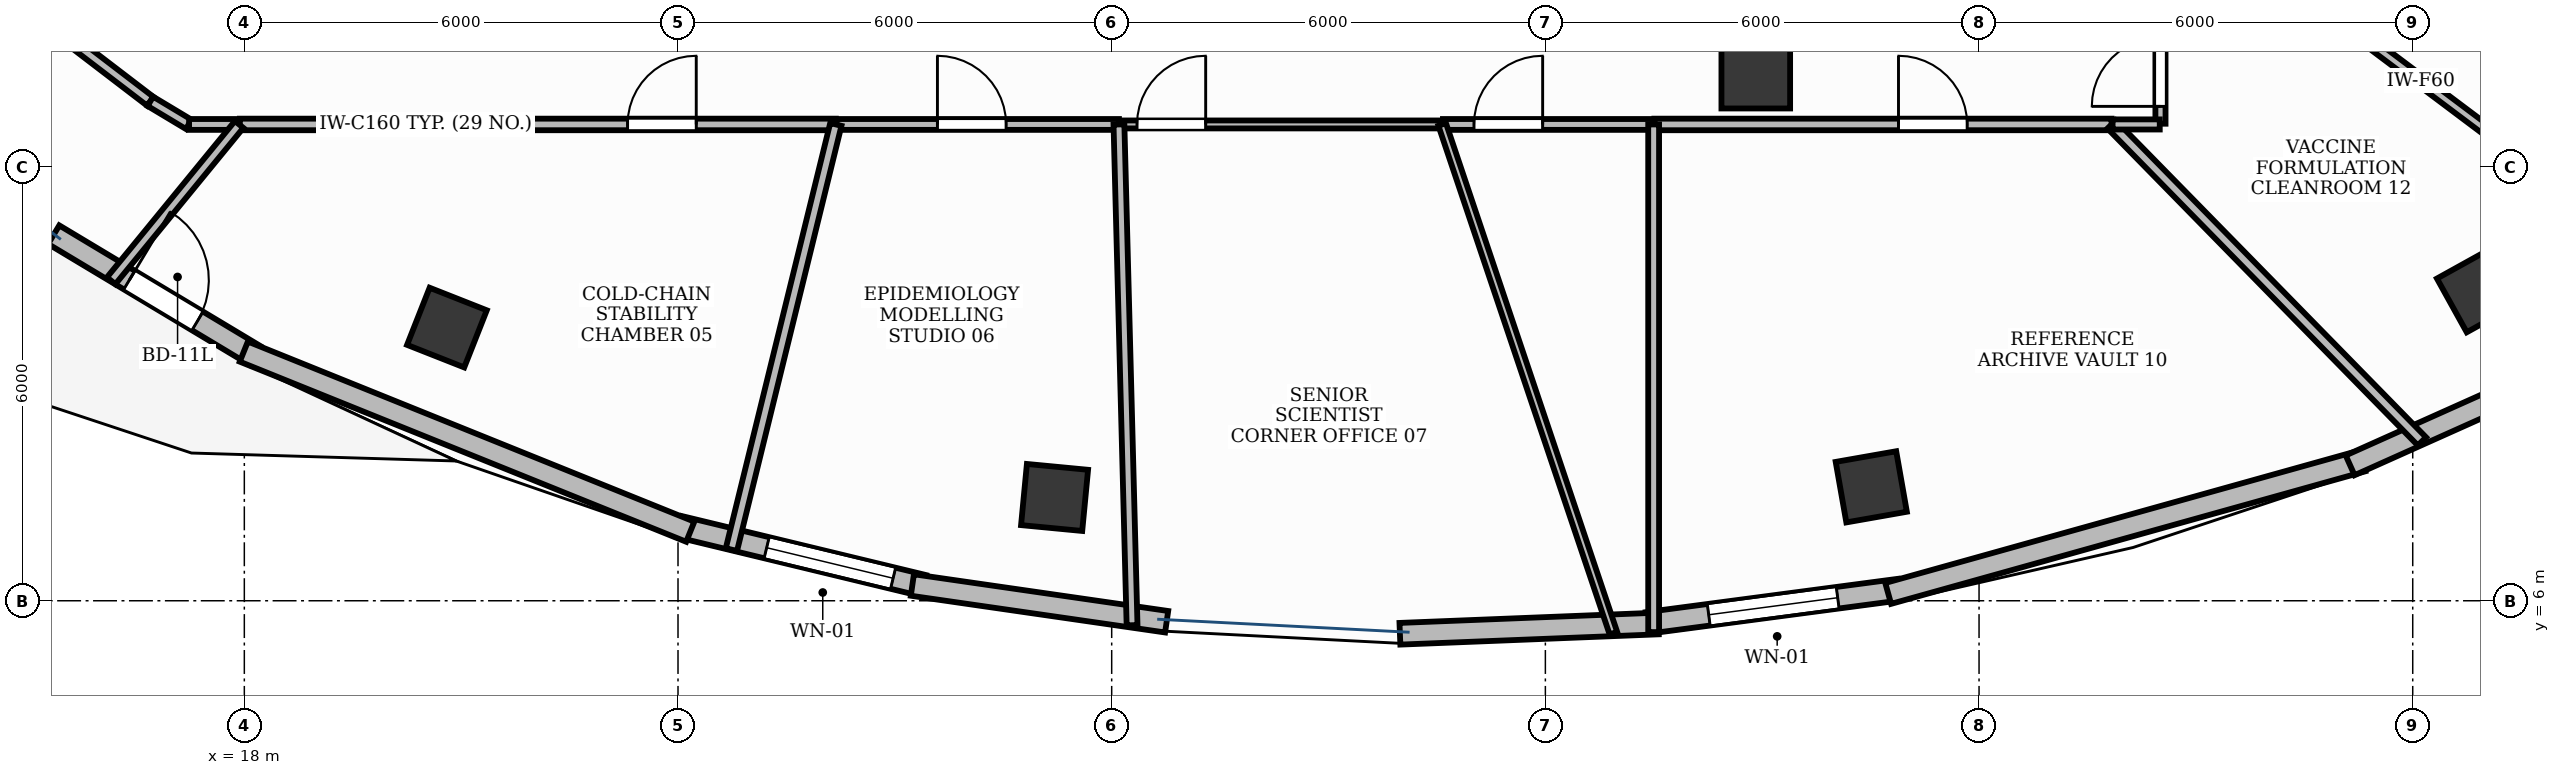
"""IFC4 building model, lengths in metres.
Left out: names, types, materials, properties, quantities, classifications, styles, units other than length and angle.
Written with IfcOpenShell. Run it as: python <this file> out.ifc"""

import sys

from ifc_helpers import new_model, si_unit, direction, frame, frame_2d, origin, origin_2d, place, context, subcontext, project, spatial, rectangle, extrude, element, fill, save


model = new_model("IFC4")
c1 = context("Model", 3, precision=1e-05, world=origin(), true_north=direction((0.0, 1.0)))
c2 = subcontext(c1, "Body", "Model", "MODEL_VIEW")
j1 = project(units=[si_unit("LENGTHUNIT", "METRE"), si_unit("PLANEANGLEUNIT", "RADIAN")], contexts=[c1])
p1 = place(None, origin())
s1 = spatial("IfcSite", under=j1, at=p1, CompositionType="ELEMENT")
p2 = place(p1, origin())
s2 = spatial("IfcBuilding", under=s1, at=p2, CompositionType="ELEMENT")
p3 = place(p2, frame((0.0, 0.0, 256.2)))
s3 = spatial("IfcBuildingStorey", under=s2, at=p3, CompositionType="ELEMENT", Elevation=256.2)
for number, where, z_axis, x_axis in (
    (1, (20.803, 9.78, -0.0), (0.0, 0.0, 1.0), (-0.93, 0.367, 0.0)),
    (2, (29.21, 7.429, -0.0), (0.0, 0.0, 1.0), (-0.995, 0.095, 0.0)),
    (3, (40.509, 7.576, -0.0), (0.0, 0.0, 1.0), (0.985, 0.173, 0.0)),
):
    element("IfcColumn", number, at=place(p3, frame(where, z_axis=z_axis, x_axis=x_axis)), inside=s3, PredefinedType="COLUMN", context=c2, shape_type="SweptSolid", body=[
        extrude(rectangle(XDim=0.85, YDim=0.85, at=origin_2d()), origin(), (0.0, 0.0, 1.0), 3.901),
    ])
p4 = place(p3, frame((38.911, 13.286, -0.0), z_axis=(0.0, 0.0, 1.0), x_axis=(1.0, 0.0, 0.0)))
e4 = element("IfcColumn", 4, at=p4, inside=s3, PredefinedType="COLUMN", context=c2, shape_type="SweptSolid", body=[
    extrude(rectangle(XDim=0.95, YDim=0.95, at=origin_2d()), origin(), (0.0, 0.0, 1.0), 3.901),
])
p5 = place(p3, frame((48.913, 10.292, -0.0), z_axis=(0.0, 0.0, 1.0), x_axis=(0.874535078577, 0.484962262797, 0.0)))
e5 = element("IfcColumn", 5, at=p5, inside=s3, PredefinedType="COLUMN", context=c2, shape_type="SweptSolid", body=[
    extrude(rectangle(XDim=0.85, YDim=0.85, at=origin_2d()), origin(), (0.0, 0.0, 1.0), 3.901),
])
p6 = place(p3, frame((15.363, 11.065, 0.0), z_axis=(0.0, 0.0, 1.0), x_axis=(0.857526080841, -0.514440492844, 0.0)))
e6 = element("IfcWall", 6, at=p6, inside=s3, PredefinedType="STANDARD", context=c2, shape_type="SweptSolid", body=[
    extrude(rectangle(XDim=3.249, YDim=0.3, at=frame_2d((1.624, 0.0))), origin(), (0.0, 0.0, 1.0), 3.9),
])
p7 = place(p6, frame((1.22, 0.0, 0.0)))
e7 = element("IfcOpeningElement", 7, at=p7, cuts=e6, PredefinedType="OPENING", context=c2, shape_type="SweptSolid", body=[
    extrude(rectangle(XDim=1.1, YDim=2.15, at=frame_2d((0.55, 1.075))), frame((0.0, 0.165, 0.0), z_axis=(0.0, -1.0, 0.0), x_axis=(1.0, 0.0, 0.0)), (0.0, 0.0, 1.0), 0.33),
])
p8 = place(p3, frame((24.022, 7.025, 0.0), z_axis=(0.0, 0.0, 1.0), x_axis=(0.972019132567, -0.23490169417, 0.0)))
e8 = element("IfcWall", 8, at=p8, inside=s3, PredefinedType="STANDARD", context=c2, shape_type="SweptSolid", body=[
    extrude(rectangle(XDim=3.472, YDim=0.3, at=frame_2d((1.736, 0.0))), origin(), (0.0, 0.0, 1.0), 3.9),
])
p9 = place(p8, frame((1.239, 0.0, 0.9)))
e9 = element("IfcOpeningElement", 9, at=p9, cuts=e8, PredefinedType="OPENING", context=c2, shape_type="SweptSolid", body=[
    extrude(rectangle(XDim=1.8, YDim=2.1, at=frame_2d((0.9, 1.05))), frame((0.0, 0.165, 0.0), z_axis=(0.0, -1.0, 0.0), x_axis=(1.0, 0.0, 0.0)), (0.0, 0.0, 1.0), 0.33),
])
p10 = place(p3, frame((37.408, 5.693, 0.0), z_axis=(0.0, 0.0, 1.0), x_axis=(0.991363126073, 0.131145538481, 0.0)))
e10 = element("IfcWall", 10, at=p10, inside=s3, PredefinedType="STANDARD", context=c2, shape_type="SweptSolid", body=[
    extrude(rectangle(XDim=3.518, YDim=0.3, at=frame_2d((1.759, 0.0))), origin(), (0.0, 0.0, 1.0), 3.9),
])
p11 = place(p10, frame((0.859, 0.0, 0.9)))
e11 = element("IfcOpeningElement", 11, at=p11, cuts=e10, PredefinedType="OPENING", context=c2, shape_type="SweptSolid", body=[
    extrude(rectangle(XDim=1.8, YDim=2.1, at=frame_2d((0.9, 1.05))), frame((0.0, 0.165, 0.0), z_axis=(0.0, -1.0, 0.0), x_axis=(1.0, 0.0, 0.0)), (0.0, 0.0, 1.0), 0.33),
])
p12 = place(p3, frame((17.993, 9.447, 0.0), z_axis=(0.0, 0.0, 1.0), x_axis=(0.927372969182, -0.374138177725, 0.0)))
e12 = element("IfcWall", 12, at=p12, inside=s3, PredefinedType="STANDARD", context=c2, shape_type="SweptSolid", body=[
    extrude(rectangle(XDim=6.66, YDim=0.3, at=frame_2d((3.33, 0.0))), origin(), (0.0, 0.0, 1.0), 3.9),
])
p13 = place(p3, frame((27.242, 6.218, 0.0), z_axis=(0.0, 0.0, 1.0), x_axis=(0.989722957179, -0.142998139962, 0.0)))
e13 = element("IfcWall", 13, at=p13, inside=s3, PredefinedType="STANDARD", context=c2, shape_type="SweptSolid", body=[
    extrude(rectangle(XDim=3.555, YDim=0.3, at=frame_2d((1.777, 0.0))), origin(), (0.0, 0.0, 1.0), 3.9),
])
p14 = place(p3, frame((33.988, 5.543, 0.0), z_axis=(0.0, 0.0, 1.0), x_axis=(0.999208461954, 0.039780014567, 0.0)))
e14 = element("IfcWall", 14, at=p14, inside=s3, PredefinedType="STANDARD", context=c2, shape_type="SweptSolid", body=[
    extrude(rectangle(XDim=3.578, YDim=0.3, at=frame_2d((1.789, 0.0))), origin(), (0.0, 0.0, 1.0), 3.9),
])
p15 = place(p3, frame((40.743, 6.101, 0.0), z_axis=(0.0, 0.0, 1.0), x_axis=(0.963088978794, 0.269183244138, 0.0)))
e15 = element("IfcWall", 15, at=p15, inside=s3, PredefinedType="STANDARD", context=c2, shape_type="SweptSolid", body=[
    extrude(rectangle(XDim=6.812, YDim=0.3, at=frame_2d((3.406, 0.0))), origin(), (0.0, 0.0, 1.0), 3.9),
])
p16 = place(p3, frame((47.134, 7.874, 0.0), z_axis=(0.0, 0.0, 1.0), x_axis=(0.912633606441, 0.408778546886, 0.0)))
e16 = element("IfcWall", 16, at=p16, inside=s3, PredefinedType="STANDARD", context=c2, shape_type="SweptSolid", body=[
    extrude(rectangle(XDim=3.387, YDim=0.3, at=frame_2d((1.693, 0.0))), origin(), (0.0, 0.0, 1.0), 3.9),
])
p17 = place(p3, frame((17.938, 12.59, 0.0), z_axis=(0.0, 0.0, 1.0), x_axis=(1.0, 0.0, 0.0)))
e17 = element("IfcWall", 17, at=p17, inside=s3, PredefinedType="PARTITIONING", context=c2, shape_type="SweptSolid", body=[
    extrude(rectangle(XDim=8.246, YDim=0.16, at=frame_2d((4.123, 0.0))), origin(), (0.0, 0.0, 1.0), 2.22),
])
p18 = place(p17, frame((5.364, 0.0, 0.0)))
e18 = element("IfcOpeningElement", 18, at=p18, cuts=e17, PredefinedType="OPENING", context=c2, shape_type="SweptSolid", body=[
    extrude(rectangle(XDim=0.95, YDim=2.15, at=frame_2d((0.475, 1.075))), frame((0.0, 0.095, 0.0), z_axis=(0.0, -1.0, 0.0), x_axis=(1.0, 0.0, 0.0)), (0.0, 0.0, 1.0), 0.19),
])
p19 = place(p3, frame((26.194, 12.59, 0.0), z_axis=(0.0, 0.0, 1.0), x_axis=(1.0, 0.0, 0.0)))
e19 = element("IfcWall", 19, at=p19, inside=s3, PredefinedType="PARTITIONING", context=c2, shape_type="SweptSolid", body=[
    extrude(rectangle(XDim=3.907, YDim=0.15, at=frame_2d((1.953, 0.0))), origin(), (0.0, 0.0, 1.0), 2.22),
])
p20 = place(p19, frame((1.396, 0.0, 0.0)))
e20 = element("IfcOpeningElement", 20, at=p20, cuts=e19, PredefinedType="OPENING", context=c2, shape_type="SweptSolid", body=[
    extrude(rectangle(XDim=0.95, YDim=2.15, at=frame_2d((0.475, 1.075))), frame((0.0, 0.09, 0.0), z_axis=(0.0, -1.0, 0.0), x_axis=(1.0, 0.0, 0.0)), (0.0, 0.0, 1.0), 0.18),
])
p21 = place(p3, frame((30.11, 12.59, 0.0), z_axis=(0.0, 0.0, 1.0), x_axis=(1.0, 0.0, 0.0)))
e21 = element("IfcWall", 21, at=p21, inside=s3, PredefinedType="MOVABLE", context=c2, shape_type="SweptSolid", body=[
    extrude(rectangle(XDim=4.462, YDim=0.11, at=frame_2d((2.231, 0.0))), origin(), (0.0, 0.0, 1.0), 2.22),
])
p22 = place(p21, frame((0.24, 0.0, 0.0)))
e22 = element("IfcOpeningElement", 22, at=p22, cuts=e21, PredefinedType="OPENING", context=c2, shape_type="SweptSolid", body=[
    extrude(rectangle(XDim=0.95, YDim=2.15, at=frame_2d((0.475, 1.075))), frame((0.0, 0.07, 0.0), z_axis=(0.0, -1.0, 0.0), x_axis=(1.0, 0.0, 0.0)), (0.0, 0.0, 1.0), 0.14),
])
p23 = place(p3, frame((34.583, 12.59, 0.0), z_axis=(0.0, 0.0, 1.0), x_axis=(1.0, 0.0, 0.0)))
e23 = element("IfcWall", 23, at=p23, inside=s3, PredefinedType="PARTITIONING", context=c2, shape_type="SweptSolid", body=[
    extrude(rectangle(XDim=2.915, YDim=0.15, at=frame_2d((1.458, 0.0))), origin(), (0.0, 0.0, 1.0), 2.22),
])
p24 = place(p23, frame((0.429, 0.0, 0.0)))
e24 = element("IfcOpeningElement", 24, at=p24, cuts=e23, PredefinedType="OPENING", context=c2, shape_type="SweptSolid", body=[
    extrude(rectangle(XDim=0.95, YDim=2.15, at=frame_2d((0.475, 1.075))), frame((0.0, 0.09, 0.0), z_axis=(0.0, -1.0, 0.0), x_axis=(1.0, 0.0, 0.0)), (0.0, 0.0, 1.0), 0.18),
])
p25 = place(p3, frame((37.508, 12.59, 0.0), z_axis=(0.0, 0.0, 1.0), x_axis=(1.0, 0.0, 0.0)))
e25 = element("IfcWall", 25, at=p25, inside=s3, PredefinedType="PARTITIONING", context=c2, shape_type="SweptSolid", body=[
    extrude(rectangle(XDim=6.325, YDim=0.16, at=frame_2d((3.163, 0.0))), origin(), (0.0, 0.0, 1.0), 2.22),
])
p26 = place(p25, frame((3.377, 0.0, 0.0)))
e26 = element("IfcOpeningElement", 26, at=p26, cuts=e25, PredefinedType="OPENING", context=c2, shape_type="SweptSolid", body=[
    extrude(rectangle(XDim=0.95, YDim=2.15, at=frame_2d((0.475, 1.075))), frame((0.0, 0.095, 0.0), z_axis=(0.0, -1.0, 0.0), x_axis=(1.0, 0.0, 0.0)), (0.0, 0.0, 1.0), 0.19),
])
p27 = place(p3, frame((44.51, 12.6, 0.0), z_axis=(0.0, 0.0, 1.0), x_axis=(0.0, 1.0, 0.0)))
e27 = element("IfcWall", 27, at=p27, inside=s3, PredefinedType="PARTITIONING", context=c2, shape_type="SweptSolid", body=[
    extrude(rectangle(XDim=3.297, YDim=0.14, at=frame_2d((1.648, 0.0))), origin(), (0.0, 0.0, 1.0), 2.22),
])
p28 = place(p27, frame((0.24, 0.0, 0.0)))
e28 = element("IfcOpeningElement", 28, at=p28, cuts=e27, PredefinedType="OPENING", context=c2, shape_type="SweptSolid", body=[
    extrude(rectangle(XDim=0.95, YDim=2.15, at=frame_2d((0.475, 1.075))), frame((0.0, 0.085, 0.0), z_axis=(0.0, -1.0, 0.0), x_axis=(1.0, 0.0, 0.0)), (0.0, 0.0, 1.0), 0.17),
])
p29 = place(p3, frame((14.516, 14.58, 0.0), z_axis=(0.0, 0.0, 1.0), x_axis=(0.794390609039, -0.60740724417, 0.0)))
e29 = element("IfcWall", 29, at=p29, inside=s3, PredefinedType="PARTITIONING", context=c2, shape_type="SweptSolid", body=[
    extrude(rectangle(XDim=2.749, YDim=0.15, at=frame_2d((1.374, 0.0))), origin(), (0.0, 0.0, 1.0), 2.22),
])
p30 = place(p3, frame((16.7, 12.91, 0.0), z_axis=(0.0, 0.0, 1.0), x_axis=(0.857458106414, -0.514553783141, 0.0)))
e30 = element("IfcWall", 30, at=p30, inside=s3, PredefinedType="PARTITIONING", context=c2, shape_type="SweptSolid", body=[
    extrude(rectangle(XDim=0.619, YDim=0.15, at=frame_2d((0.309, 0.0))), origin(), (0.0, 0.0, 1.0), 2.22),
])
p31 = place(p3, frame((17.236, 12.59, 0.0), z_axis=(0.0, 0.0, 1.0), x_axis=(1.0, 0.0, 0.0)))
e31 = element("IfcWall", 31, at=p31, inside=s3, PredefinedType="PARTITIONING", context=c2, shape_type="SweptSolid", body=[
    extrude(rectangle(XDim=0.692, YDim=0.15, at=frame_2d((0.346, 0.0))), origin(), (0.0, 0.0, 1.0), 2.22),
])
p32 = place(p3, frame((17.928, 12.59, 0.0), z_axis=(0.0, 0.0, 1.0), x_axis=(-0.633318665549, -0.773891121455, 0.0)))
e32 = element("IfcWall", 32, at=p32, inside=s3, PredefinedType="PARTITIONING", context=c2, shape_type="SweptSolid", body=[
    extrude(rectangle(XDim=2.794, YDim=0.15, at=frame_2d((1.397, 0.0))), origin(), (0.0, 0.0, 1.0), 2.22),
])
p33 = place(p3, frame((26.184, 12.59, 0.0), z_axis=(0.0, 0.0, 1.0), x_axis=(-0.238531404219, -0.971134784261, 0.0)))
e33 = element("IfcWall", 33, at=p33, inside=s3, PredefinedType="PARTITIONING", context=c2, shape_type="SweptSolid", body=[
    extrude(rectangle(XDim=6.057, YDim=0.16, at=frame_2d((3.029, 0.0))), origin(), (0.0, 0.0, 1.0), 2.22),
])
p34 = place(p3, frame((30.1, 12.59, 0.0), z_axis=(0.0, 0.0, 1.0), x_axis=(0.026207563796, -0.999656522812, 0.0)))
e34 = element("IfcWall", 34, at=p34, inside=s3, PredefinedType="PARTITIONING", context=c2, shape_type="SweptSolid", body=[
    extrude(rectangle(XDim=6.931, YDim=0.15, at=frame_2d((3.465, 0.0))), origin(), (0.0, 0.0, 1.0), 2.22),
])
p35 = place(p3, frame((34.573, 12.59, 0.0), z_axis=(0.0, 0.0, 1.0), x_axis=(0.318948473563, -0.947772056568, 0.0)))
e35 = element("IfcWall", 35, at=p35, inside=s3, PredefinedType="MOVABLE", context=c2, shape_type="SweptSolid", body=[
    extrude(rectangle(XDim=7.427, YDim=0.11, at=frame_2d((3.713, 0.0))), origin(), (0.0, 0.0, 1.0), 2.22),
])
p36 = place(p3, frame((37.498, 12.59, 0.0), z_axis=(0.0, 0.0, 1.0), x_axis=(0.0, -1.0, 0.0)))
e36 = element("IfcWall", 36, at=p36, inside=s3, PredefinedType="PARTITIONING", context=c2, shape_type="SweptSolid", body=[
    extrude(rectangle(XDim=7.024, YDim=0.15, at=frame_2d((3.512, 0.0))), origin(), (0.0, 0.0, 1.0), 2.22),
])
p37 = place(p3, frame((43.833, 12.59, 0.0), z_axis=(0.0, 0.0, 1.0), x_axis=(0.699668373954, -0.714467750489, 0.0)))
e37 = element("IfcWall", 37, at=p37, inside=s3, PredefinedType="PARTITIONING", context=c2, shape_type="SweptSolid", body=[
    extrude(rectangle(XDim=6.137, YDim=0.16, at=frame_2d((3.068, 0.0))), origin(), (0.0, 0.0, 1.0), 2.22),
])
p38 = place(p3, frame((43.848, 12.59, 0.0), z_axis=(0.0, 0.0, 1.0), x_axis=(1.0, 0.0, 0.0)))
e38 = element("IfcWall", 38, at=p38, inside=s3, PredefinedType="PARTITIONING", context=c2, shape_type="SweptSolid", body=[
    extrude(rectangle(XDim=0.652, YDim=0.14, at=frame_2d((0.326, 0.0))), origin(), (0.0, 0.0, 1.0), 2.22),
])
p39 = place(p3, frame((44.51, 15.897, 0.0), z_axis=(0.0, 0.0, 1.0), x_axis=(0.79968453469, -0.600420390209, 0.0)))
e39 = element("IfcWall", 39, at=p39, inside=s3, PredefinedType="PARTITIONING", context=c2, shape_type="SweptSolid", body=[
    extrude(rectangle(XDim=9.011, YDim=0.14, at=frame_2d((4.506, 0.0))), origin(), (0.0, 0.0, 1.0), 2.22),
])
p40 = place(p7, origin())
e40 = element("IfcDoor", 40, at=p40, inside=s3, OperationType="SINGLE_SWING_LEFT", PredefinedType="DOOR", context=c2, shape_type="SweptSolid", body=[
    extrude(rectangle(XDim=1.1, YDim=2.15, at=frame_2d((0.55, 1.075))), frame((0.0, 0.025, 0.0), z_axis=(0.0, -1.0, 0.0), x_axis=(1.0, 0.0, 0.0)), (0.0, 0.0, 1.0), 0.05),
])
fill(e7, e40)
p41 = place(p9, origin())
e41 = element("IfcWindow", 41, at=p41, inside=s3, PartitioningType="SINGLE_PANEL", PredefinedType="WINDOW", context=c2, shape_type="SweptSolid", body=[
    extrude(rectangle(XDim=1.8, YDim=2.1, at=frame_2d((0.9, 1.05))), frame((0.0, 0.03, 0.0), z_axis=(0.0, -1.0, 0.0), x_axis=(1.0, 0.0, 0.0)), (0.0, 0.0, 1.0), 0.06),
])
fill(e9, e41)
p42 = place(p11, origin())
e42 = element("IfcWindow", 42, at=p42, inside=s3, PartitioningType="SINGLE_PANEL", PredefinedType="WINDOW", context=c2, shape_type="SweptSolid", body=[
    extrude(rectangle(XDim=1.8, YDim=2.1, at=frame_2d((0.9, 1.05))), frame((0.0, 0.03, 0.0), z_axis=(0.0, -1.0, 0.0), x_axis=(1.0, 0.0, 0.0)), (0.0, 0.0, 1.0), 0.06),
])
fill(e11, e42)
p43 = place(p18, origin())
e43 = element("IfcDoor", 43, at=p43, inside=s3, OperationType="SINGLE_SWING_RIGHT", PredefinedType="DOOR", context=c2, shape_type="SweptSolid", body=[
    extrude(rectangle(XDim=0.95, YDim=2.15, at=frame_2d((0.475, 1.075))), frame((0.0, 0.025, 0.0), z_axis=(0.0, -1.0, 0.0), x_axis=(1.0, 0.0, 0.0)), (0.0, 0.0, 1.0), 0.05),
])
fill(e18, e43)
p44 = place(p20, origin())
e44 = element("IfcDoor", 44, at=p44, inside=s3, OperationType="SINGLE_SWING_LEFT", PredefinedType="DOOR", context=c2, shape_type="SweptSolid", body=[
    extrude(rectangle(XDim=0.95, YDim=2.15, at=frame_2d((0.475, 1.075))), frame((0.0, 0.025, 0.0), z_axis=(0.0, -1.0, 0.0), x_axis=(1.0, 0.0, 0.0)), (0.0, 0.0, 1.0), 0.05),
])
fill(e20, e44)
p45 = place(p22, origin())
e45 = element("IfcDoor", 45, at=p45, inside=s3, OperationType="SINGLE_SWING_RIGHT", PredefinedType="DOOR", context=c2, shape_type="SweptSolid", body=[
    extrude(rectangle(XDim=0.95, YDim=2.15, at=frame_2d((0.475, 1.075))), frame((0.0, 0.025, 0.0), z_axis=(0.0, -1.0, 0.0), x_axis=(1.0, 0.0, 0.0)), (0.0, 0.0, 1.0), 0.05),
])
fill(e22, e45)
p46 = place(p24, origin())
e46 = element("IfcDoor", 46, at=p46, inside=s3, OperationType="SINGLE_SWING_RIGHT", PredefinedType="DOOR", context=c2, shape_type="SweptSolid", body=[
    extrude(rectangle(XDim=0.95, YDim=2.15, at=frame_2d((0.475, 1.075))), frame((0.0, 0.025, 0.0), z_axis=(0.0, -1.0, 0.0), x_axis=(1.0, 0.0, 0.0)), (0.0, 0.0, 1.0), 0.05),
])
fill(e24, e46)
p47 = place(p26, origin())
e47 = element("IfcDoor", 47, at=p47, inside=s3, OperationType="SINGLE_SWING_LEFT", PredefinedType="DOOR", context=c2, shape_type="SweptSolid", body=[
    extrude(rectangle(XDim=0.95, YDim=2.15, at=frame_2d((0.475, 1.075))), frame((0.0, 0.025, 0.0), z_axis=(0.0, -1.0, 0.0), x_axis=(1.0, 0.0, 0.0)), (0.0, 0.0, 1.0), 0.05),
])
fill(e26, e47)
p48 = place(p28, origin())
e48 = element("IfcDoor", 48, at=p48, inside=s3, OperationType="SINGLE_SWING_LEFT", PredefinedType="DOOR", context=c2, shape_type="SweptSolid", body=[
    extrude(rectangle(XDim=0.95, YDim=2.15, at=frame_2d((0.475, 1.075))), frame((0.0, 0.025, 0.0), z_axis=(0.0, -1.0, 0.0), x_axis=(1.0, 0.0, 0.0)), (0.0, 0.0, 1.0), 0.05),
])
fill(e28, e48)
save(model, sys.argv[1])
